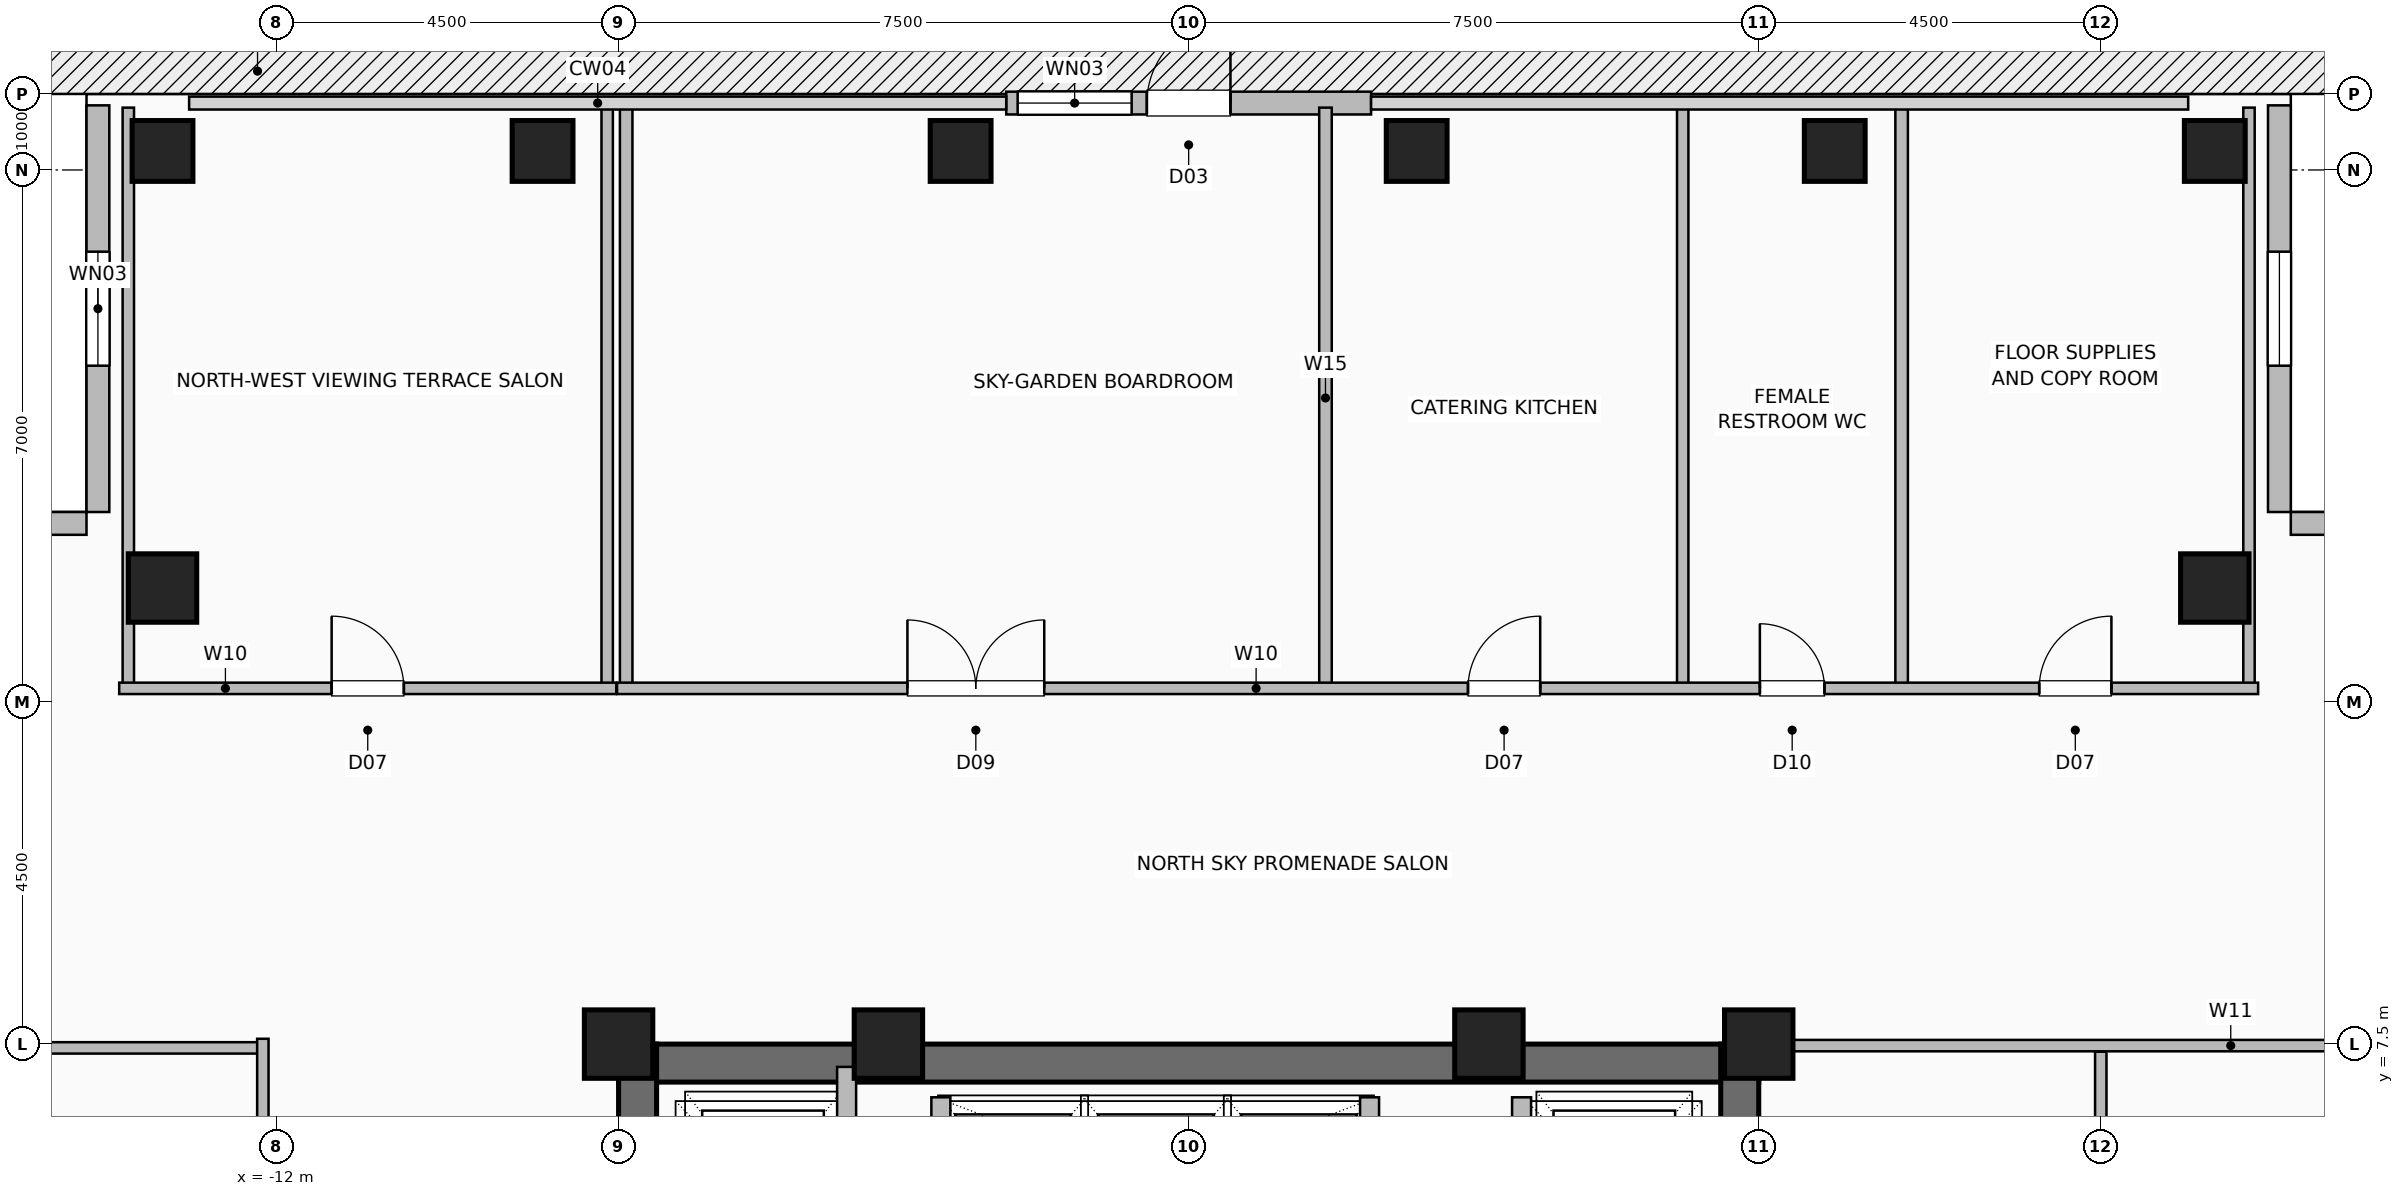
"""IFC4 building model, lengths in metres.
Left out: names, types, materials, properties, quantities, classifications, styles, units other than length and angle.
Written with IfcOpenShell. Run it as: python <this file> out.ifc"""

import sys

from ifc_helpers import new_model, si_unit, direction, frame, frame_2d, origin, origin_2d, place, context, subcontext, project, spatial, rectangle, hollow_rectangle, extrude, element, fill, save


model = new_model("IFC4")
c1 = context("Model", 3, precision=1e-05, world=origin(), true_north=direction((0.0, 1.0)))
c2 = subcontext(c1, "Body", "Model", "MODEL_VIEW")
j1 = project(units=[si_unit("LENGTHUNIT", "METRE"), si_unit("PLANEANGLEUNIT", "RADIAN")], contexts=[c1])
p1 = place(None, origin())
s1 = spatial("IfcSite", under=j1, at=p1, CompositionType="ELEMENT")
p2 = place(p1, origin())
s2 = spatial("IfcBuilding", under=s1, at=p2, CompositionType="ELEMENT")
p3 = place(p2, frame((0.0, 0.0, 166.2)))
s3 = spatial("IfcBuildingStorey", under=s2, at=p3, CompositionType="ELEMENT", Elevation=166.2)
for number, where, z_axis, x_axis in (
    (1, (7.5, 7.5, 0.0), (0.0, 0.0, 1.0), (1.0, 0.0, 0.0)),
    (2, (3.95, 7.5, 0.0), (0.0, 0.0, 1.0), (1.0, 0.0, 0.0)),
    (3, (-3.95, 7.5, 0.0), (0.0, 0.0, 1.0), (1.0, 0.0, 0.0)),
    (4, (-7.5, 7.5, 0.0), (0.0, 0.0, 1.0), (1.0, 0.0, 0.0)),
):
    element("IfcColumn", number, at=place(p3, frame(where, z_axis=z_axis, x_axis=x_axis)), inside=s3, PredefinedType="COLUMN", context=c2, shape_type="SweptSolid", body=[
        extrude(hollow_rectangle(XDim=0.9, YDim=0.9, WallThickness=0.045, at=origin_2d()), origin(), (0.0, 0.0, 1.0), 3.6),
    ])
for number, where, z_axis, x_axis in (
    (5, (-13.5, 19.25, -0.4), (0.0, 0.0, 1.0), (1.0, 0.0, 0.0)),
    (6, (-8.5, 19.25, -0.4), (0.0, 0.0, 1.0), (1.0, 0.0, 0.0)),
    (7, (-3.0, 19.25, -0.4), (0.0, 0.0, 1.0), (1.0, 0.0, 0.0)),
    (8, (3.0, 19.25, -0.4), (0.0, 0.0, 1.0), (1.0, 0.0, 0.0)),
    (9, (8.5, 19.25, -0.4), (0.0, 0.0, 1.0), (1.0, 0.0, 0.0)),
    (10, (13.5, 19.25, -0.4), (0.0, 0.0, 1.0), (1.0, 0.0, 0.0)),
):
    element("IfcColumn", number, at=place(p3, frame(where, z_axis=z_axis, x_axis=x_axis)), inside=s3, PredefinedType="COLUMN", context=c2, shape_type="SweptSolid", body=[
        extrude(hollow_rectangle(XDim=0.8, YDim=0.8, WallThickness=0.04, at=origin_2d()), origin(), (0.0, 0.0, 1.0), 4.0),
    ])
for number, where, z_axis, x_axis in (
    (11, (13.5, 13.5, -0.4), (0.0, 0.0, 1.0), (1.0, 0.0, 0.0)),
    (12, (-13.5, 13.5, -0.4), (0.0, 0.0, 1.0), (1.0, 0.0, 0.0)),
):
    element("IfcColumn", number, at=place(p3, frame(where, z_axis=z_axis, x_axis=x_axis)), inside=s3, PredefinedType="COLUMN", context=c2, shape_type="SweptSolid", body=[
        extrude(hollow_rectangle(XDim=0.9, YDim=0.9, WallThickness=0.045, at=origin_2d()), origin(), (0.0, 0.0, 1.0), 4.0),
    ])
p4 = place(p3, frame((-2.4, 19.88, 0.0), z_axis=(0.0, 0.0, 1.0), x_axis=(1.0, 0.0, 0.0)))
e13 = element("IfcWall", 13, at=p4, inside=s3, PredefinedType="SOLIDWALL", context=c2, shape_type="SweptSolid", body=[
    extrude(rectangle(XDim=4.8, YDim=0.3, at=frame_2d((2.4, 0.0))), origin(), (0.0, 0.0, 1.0), 3.36),
])
p5 = place(p4, frame((1.85, 0.0, 0.0)))
e14 = element("IfcOpeningElement", 14, at=p5, cuts=e13, PredefinedType="OPENING", context=c2, shape_type="SweptSolid", body=[
    extrude(rectangle(XDim=1.1, YDim=2.2, at=frame_2d((0.55, 1.1))), frame((0.0, 0.16, 0.0), z_axis=(0.0, -1.0, 0.0), x_axis=(1.0, 0.0, 0.0)), (0.0, 0.0, 1.0), 0.32),
])
p6 = place(p4, frame((0.15, 0.0, 0.85)))
e15 = element("IfcOpeningElement", 15, at=p6, cuts=e13, PredefinedType="OPENING", context=c2, shape_type="SweptSolid", body=[
    extrude(rectangle(XDim=1.5, YDim=1.8, at=frame_2d((0.75, 0.9))), frame((0.0, 0.16, 0.0), z_axis=(0.0, -1.0, 0.0), x_axis=(1.0, 0.0, 0.0)), (0.0, 0.0, 1.0), 0.32),
])
p7 = place(p3, frame((14.35, 19.85, 0.0), z_axis=(0.0, 0.0, 1.0), x_axis=(0.0, -1.0, 0.0)))
e16 = element("IfcWall", 16, at=p7, inside=s3, PredefinedType="SOLIDWALL", context=c2, shape_type="SweptSolid", body=[
    extrude(rectangle(XDim=5.35, YDim=0.3, at=frame_2d((2.675, 0.0))), origin(), (0.0, 0.0, 1.0), 3.36),
])
p8 = place(p7, frame((1.925, 0.0, 0.9)))
e17 = element("IfcOpeningElement", 17, at=p8, cuts=e16, PredefinedType="OPENING", context=c2, shape_type="SweptSolid", body=[
    extrude(rectangle(XDim=1.5, YDim=1.8, at=frame_2d((0.75, 0.9))), frame((0.0, 0.16, 0.0), z_axis=(0.0, -1.0, 0.0), x_axis=(1.0, 0.0, 0.0)), (0.0, 0.0, 1.0), 0.32),
])
p9 = place(p3, frame((19.85, 14.35, 0.0), z_axis=(0.0, 0.0, 1.0), x_axis=(-1.0, 0.0, 0.0)))
e18 = element("IfcWall", 18, at=p9, inside=s3, PredefinedType="SOLIDWALL", context=c2, shape_type="SweptSolid", body=[
    extrude(rectangle(XDim=5.35, YDim=0.3, at=frame_2d((2.675, 0.0))), origin(), (0.0, 0.0, 1.0), 3.36),
])
p10 = place(p3, frame((-14.35, 19.85, 0.0), z_axis=(0.0, 0.0, 1.0), x_axis=(0.0, -1.0, 0.0)))
e19 = element("IfcWall", 19, at=p10, inside=s3, PredefinedType="SOLIDWALL", context=c2, shape_type="SweptSolid", body=[
    extrude(rectangle(XDim=5.35, YDim=0.3, at=frame_2d((2.675, 0.0))), origin(), (0.0, 0.0, 1.0), 3.36),
])
p11 = place(p10, frame((1.925, 0.0, 0.9)))
e20 = element("IfcOpeningElement", 20, at=p11, cuts=e19, PredefinedType="OPENING", context=c2, shape_type="SweptSolid", body=[
    extrude(rectangle(XDim=1.5, YDim=1.8, at=frame_2d((0.75, 0.9))), frame((0.0, 0.16, 0.0), z_axis=(0.0, -1.0, 0.0), x_axis=(1.0, 0.0, 0.0)), (0.0, 0.0, 1.0), 0.32),
])
p12 = place(p3, frame((-19.85, 14.35, 0.0), z_axis=(0.0, 0.0, 1.0), x_axis=(1.0, 0.0, 0.0)))
e21 = element("IfcWall", 21, at=p12, inside=s3, PredefinedType="SOLIDWALL", context=c2, shape_type="SweptSolid", body=[
    extrude(rectangle(XDim=5.35, YDim=0.3, at=frame_2d((2.675, 0.0))), origin(), (0.0, 0.0, 1.0), 3.36),
])
p13 = place(p3, frame((-7.5, 7.25, 0.0), z_axis=(0.0, 0.0, 1.0), x_axis=(1.0, 0.0, 0.0)))
e22 = element("IfcWall", 22, at=p13, inside=s3, PredefinedType="SHEAR", context=c2, shape_type="SweptSolid", body=[
    extrude(rectangle(XDim=15.0, YDim=0.5, at=frame_2d((7.5, 0.0))), origin(), (0.0, 0.0, 1.0), 3.36),
])
p14 = place(p3, frame((-7.25, -7.5, 0.0), z_axis=(0.0, 0.0, 1.0), x_axis=(0.0, 1.0, 0.0)))
e23 = element("IfcWall", 23, at=p14, inside=s3, PredefinedType="SHEAR", context=c2, shape_type="SweptSolid", body=[
    extrude(rectangle(XDim=15.0, YDim=0.5, at=frame_2d((7.5, 0.0))), origin(), (0.0, 0.0, 1.0), 3.36),
])
p15 = place(p14, frame((9.5, 0.0, 0.0)))
e24 = element("IfcOpeningElement", 24, at=p15, cuts=e23, PredefinedType="OPENING", context=c2, shape_type="SweptSolid", body=[
    extrude(rectangle(XDim=1.0, YDim=2.08, at=frame_2d((0.5, 1.04))), frame((0.0, 0.26, 0.0), z_axis=(0.0, -1.0, 0.0), x_axis=(1.0, 0.0, 0.0)), (0.0, 0.0, 1.0), 0.52),
])
p16 = place(p3, frame((7.25, -7.5, 0.0), z_axis=(0.0, 0.0, 1.0), x_axis=(0.0, 1.0, 0.0)))
e25 = element("IfcWall", 25, at=p16, inside=s3, PredefinedType="SHEAR", context=c2, shape_type="SweptSolid", body=[
    extrude(rectangle(XDim=15.0, YDim=0.5, at=frame_2d((7.5, 0.0))), origin(), (0.0, 0.0, 1.0), 3.36),
])
for number, where, z_axis, x_axis in (
    (26, (-3.26, 4.58, 0.0), (0.0, 0.0, 1.0), (0.0, 1.0, 0.0)),
    (27, (2.38, 4.58, 0.0), (0.0, 0.0, 1.0), (0.0, 1.0, 0.0)),
):
    element("IfcWall", number, at=place(p3, frame(where, z_axis=z_axis, x_axis=x_axis)), inside=s3, PredefinedType="SHEAR", context=c2, shape_type="SweptSolid", body=[
        extrude(rectangle(XDim=2.22, YDim=0.25, at=frame_2d((1.11, 0.0))), origin(), (0.0, 0.0, 1.0), 3.36),
    ])
p17 = place(p3, frame((-4.5, 4.35, 0.0), z_axis=(0.0, 0.0, 1.0), x_axis=(0.0, 1.0, 0.0)))
e28 = element("IfcWall", 28, at=p17, inside=s3, PredefinedType="SHEAR", context=c2, shape_type="SweptSolid", body=[
    extrude(rectangle(XDim=2.85, YDim=0.25, at=frame_2d((1.425, 0.0))), origin(), (0.0, 0.0, 1.0), 3.36),
])
p18 = place(p3, frame((4.38, 4.3, 0.0), z_axis=(0.0, 0.0, 1.0), x_axis=(0.0, 1.0, 0.0)))
e29 = element("IfcWall", 29, at=p18, inside=s3, PredefinedType="SHEAR", context=c2, shape_type="SweptSolid", body=[
    extrude(rectangle(XDim=2.5, YDim=0.25, at=frame_2d((1.25, 0.0))), origin(), (0.0, 0.0, 1.0), 3.36),
])
p19 = place(p18, frame((0.8, 0.0, 0.0)))
e30 = element("IfcOpeningElement", 30, at=p19, cuts=e29, PredefinedType="OPENING", context=c2, shape_type="SweptSolid", body=[
    extrude(rectangle(XDim=1.2, YDim=2.2, at=frame_2d((0.6, 1.1))), frame((0.0, 0.135, 0.0), z_axis=(0.0, -1.0, 0.0), x_axis=(1.0, 0.0, 0.0)), (0.0, 0.0, 1.0), 0.27),
])
p20 = place(p3, frame((-19.82, 7.45, 0.0), z_axis=(0.0, 0.0, 1.0), x_axis=(1.0, 0.0, 0.0)))
e31 = element("IfcWall", 31, at=p20, inside=s3, PredefinedType="PARTITIONING", context=c2, shape_type="SweptSolid", body=[
    extrude(rectangle(XDim=7.64, YDim=0.15, at=frame_2d((3.82, 0.0))), origin(), (0.0, 0.0, 1.0), 3.36),
])
p21 = place(p3, frame((-12.18, -7.57, 0.0), z_axis=(0.0, 0.0, 1.0), x_axis=(0.0, 1.0, 0.0)))
e32 = element("IfcWall", 32, at=p21, inside=s3, PredefinedType="PARTITIONING", context=c2, shape_type="SweptSolid", body=[
    extrude(rectangle(XDim=15.14, YDim=0.15, at=frame_2d((7.57, 0.0))), origin(), (0.0, 0.0, 1.0), 3.36),
])
p22 = place(p21, frame((5.045, 0.0, 0.0)))
e33 = element("IfcOpeningElement", 33, at=p22, cuts=e32, PredefinedType="OPENING", context=c2, shape_type="SweptSolid", body=[
    extrude(rectangle(XDim=1.8, YDim=2.08, at=frame_2d((0.9, 1.04))), frame((0.0, 0.085, 0.0), z_axis=(0.0, -1.0, 0.0), x_axis=(1.0, 0.0, 0.0)), (0.0, 0.0, 1.0), 0.17),
])
p23 = place(p21, frame((12.97, 0.0, 0.0)))
e34 = element("IfcOpeningElement", 34, at=p23, cuts=e32, PredefinedType="OPENING", context=c2, shape_type="SweptSolid", body=[
    extrude(rectangle(XDim=0.85, YDim=2.05, at=frame_2d((0.425, 1.025))), frame((0.0, 0.085, 0.0), z_axis=(0.0, -1.0, 0.0), x_axis=(1.0, 0.0, 0.0)), (0.0, 0.0, 1.0), 0.17),
])
for number, where, z_axis, x_axis in (
    (35, (-13.95, 12.18, 0.0), (0.0, 0.0, 1.0), (0.0, 1.0, 0.0)),
    (36, (-7.65, 12.18, 0.0), (0.0, 0.0, 1.0), (0.0, 1.0, 0.0)),
):
    element("IfcWall", number, at=place(p3, frame(where, z_axis=z_axis, x_axis=x_axis)), inside=s3, PredefinedType="PARTITIONING", context=c2, shape_type="SweptSolid", body=[
        extrude(rectangle(XDim=7.64, YDim=0.15, at=frame_2d((3.82, 0.0))), origin(), (0.0, 0.0, 1.0), 3.36),
    ])
p24 = place(p3, frame((-14.07, 12.18, 0.0), z_axis=(0.0, 0.0, 1.0), x_axis=(1.0, 0.0, 0.0)))
e37 = element("IfcWall", 37, at=p24, inside=s3, PredefinedType="PARTITIONING", context=c2, shape_type="SweptSolid", body=[
    extrude(rectangle(XDim=6.54, YDim=0.15, at=frame_2d((3.27, 0.0))), origin(), (0.0, 0.0, 1.0), 3.36),
])
p25 = place(p24, frame((2.795, 0.0, 0.0)))
e38 = element("IfcOpeningElement", 38, at=p25, cuts=e37, PredefinedType="OPENING", context=c2, shape_type="SweptSolid", body=[
    extrude(rectangle(XDim=0.95, YDim=2.06, at=frame_2d((0.475, 1.03))), frame((0.0, 0.085, 0.0), z_axis=(0.0, -1.0, 0.0), x_axis=(1.0, 0.0, 0.0)), (0.0, 0.0, 1.0), 0.17),
])
for number, where, z_axis, x_axis in (
    (39, (9.38, 12.18, 0.0), (0.0, 0.0, 1.0), (0.0, 1.0, 0.0)),
    (40, (-7.4, 12.18, 0.0), (0.0, 0.0, 1.0), (0.0, 1.0, 0.0)),
    (41, (1.8, 12.18, 0.0), (0.0, 0.0, 1.0), (0.0, 1.0, 0.0)),
):
    element("IfcWall", number, at=place(p3, frame(where, z_axis=z_axis, x_axis=x_axis)), inside=s3, PredefinedType="PLUMBINGWALL", context=c2, shape_type="SweptSolid", body=[
        extrude(rectangle(XDim=7.64, YDim=0.165, at=frame_2d((3.82, 0.0))), origin(), (0.0, 0.0, 1.0), 3.36),
    ])
for number, where, z_axis, x_axis in (
    (42, (6.5, 12.18, 0.0), (0.0, 0.0, 1.0), (0.0, 1.0, 0.0)),
    (43, (13.95, 12.18, 0.0), (0.0, 0.0, 1.0), (0.0, 1.0, 0.0)),
):
    element("IfcWall", number, at=place(p3, frame(where, z_axis=z_axis, x_axis=x_axis)), inside=s3, PredefinedType="PARTITIONING", context=c2, shape_type="SweptSolid", body=[
        extrude(rectangle(XDim=7.64, YDim=0.15, at=frame_2d((3.82, 0.0))), origin(), (0.0, 0.0, 1.0), 3.36),
    ])
p26 = place(p3, frame((-7.52, 12.18, 0.0), z_axis=(0.0, 0.0, 1.0), x_axis=(1.0, 0.0, 0.0)))
e44 = element("IfcWall", 44, at=p26, inside=s3, PredefinedType="PARTITIONING", context=c2, shape_type="SweptSolid", body=[
    extrude(rectangle(XDim=21.59, YDim=0.15, at=frame_2d((10.795, 0.0))), origin(), (0.0, 0.0, 1.0), 3.36),
])
p27 = place(p26, frame((3.82, 0.0, 0.0)))
e45 = element("IfcOpeningElement", 45, at=p27, cuts=e44, PredefinedType="OPENING", context=c2, shape_type="SweptSolid", body=[
    extrude(rectangle(XDim=1.8, YDim=2.08, at=frame_2d((0.9, 1.04))), frame((0.0, 0.085, 0.0), z_axis=(0.0, -1.0, 0.0), x_axis=(1.0, 0.0, 0.0)), (0.0, 0.0, 1.0), 0.17),
])
p28 = place(p26, frame((11.195, 0.0, 0.0)))
e46 = element("IfcOpeningElement", 46, at=p28, cuts=e44, PredefinedType="OPENING", context=c2, shape_type="SweptSolid", body=[
    extrude(rectangle(XDim=0.95, YDim=2.06, at=frame_2d((0.475, 1.03))), frame((0.0, 0.085, 0.0), z_axis=(0.0, -1.0, 0.0), x_axis=(1.0, 0.0, 0.0)), (0.0, 0.0, 1.0), 0.17),
])
p29 = place(p26, frame((15.035, 0.0, 0.0)))
e47 = element("IfcOpeningElement", 47, at=p29, cuts=e44, PredefinedType="OPENING", context=c2, shape_type="SweptSolid", body=[
    extrude(rectangle(XDim=0.85, YDim=2.05, at=frame_2d((0.425, 1.025))), frame((0.0, 0.085, 0.0), z_axis=(0.0, -1.0, 0.0), x_axis=(1.0, 0.0, 0.0)), (0.0, 0.0, 1.0), 0.17),
])
p30 = place(p26, frame((18.71, 0.0, 0.0)))
e48 = element("IfcOpeningElement", 48, at=p30, cuts=e44, PredefinedType="OPENING", context=c2, shape_type="SweptSolid", body=[
    extrude(rectangle(XDim=0.95, YDim=2.06, at=frame_2d((0.475, 1.03))), frame((0.0, 0.085, 0.0), z_axis=(0.0, -1.0, 0.0), x_axis=(1.0, 0.0, 0.0)), (0.0, 0.0, 1.0), 0.17),
])
p31 = place(p3, frame((12.0, -7.48, 0.0), z_axis=(0.0, 0.0, 1.0), x_axis=(0.0, 1.0, 0.0)))
e49 = element("IfcWall", 49, at=p31, inside=s3, PredefinedType="PARTITIONING", context=c2, shape_type="SweptSolid", body=[
    extrude(rectangle(XDim=14.88, YDim=0.15, at=frame_2d((7.44, 0.0))), origin(), (0.0, 0.0, 1.0), 3.36),
])
p32 = place(p3, frame((7.6, 7.48, 0.0), z_axis=(0.0, 0.0, 1.0), x_axis=(1.0, 0.0, 0.0)))
e50 = element("IfcWall", 50, at=p32, inside=s3, PredefinedType="PARTITIONING", context=c2, shape_type="SweptSolid", body=[
    extrude(rectangle(XDim=12.22, YDim=0.15, at=frame_2d((6.11, 0.0))), origin(), (0.0, 0.0, 1.0), 3.36),
])
p33 = place(p5, origin())
e51 = element("IfcDoor", 51, at=p33, inside=s3, OperationType="SINGLE_SWING_RIGHT", PredefinedType="DOOR", context=c2, shape_type="SweptSolid", body=[
    extrude(rectangle(XDim=1.1, YDim=2.2, at=frame_2d((0.55, 1.1))), frame((0.0, 0.025, 0.0), z_axis=(0.0, -1.0, 0.0), x_axis=(1.0, 0.0, 0.0)), (0.0, 0.0, 1.0), 0.05),
])
fill(e14, e51)
p34 = place(p6, origin())
e52 = element("IfcWindow", 52, at=p34, inside=s3, PartitioningType="SINGLE_PANEL", PredefinedType="WINDOW", context=c2, shape_type="SweptSolid", body=[
    extrude(rectangle(XDim=1.5, YDim=1.8, at=frame_2d((0.75, 0.9))), frame((0.0, 0.03, 0.0), z_axis=(0.0, -1.0, 0.0), x_axis=(1.0, 0.0, 0.0)), (0.0, 0.0, 1.0), 0.06),
])
fill(e15, e52)
p35 = place(p8, origin())
e53 = element("IfcWindow", 53, at=p35, inside=s3, PartitioningType="SINGLE_PANEL", PredefinedType="WINDOW", context=c2, shape_type="SweptSolid", body=[
    extrude(rectangle(XDim=1.5, YDim=1.8, at=frame_2d((0.75, 0.9))), frame((0.0, 0.03, 0.0), z_axis=(0.0, -1.0, 0.0), x_axis=(1.0, 0.0, 0.0)), (0.0, 0.0, 1.0), 0.06),
])
fill(e17, e53)
p36 = place(p11, origin())
e54 = element("IfcWindow", 54, at=p36, inside=s3, PartitioningType="SINGLE_PANEL", PredefinedType="WINDOW", context=c2, shape_type="SweptSolid", body=[
    extrude(rectangle(XDim=1.5, YDim=1.8, at=frame_2d((0.75, 0.9))), frame((0.0, 0.03, 0.0), z_axis=(0.0, -1.0, 0.0), x_axis=(1.0, 0.0, 0.0)), (0.0, 0.0, 1.0), 0.06),
])
fill(e20, e54)
p37 = place(p25, origin())
e55 = element("IfcDoor", 55, at=p37, inside=s3, OperationType="SINGLE_SWING_LEFT", PredefinedType="DOOR", context=c2, shape_type="SweptSolid", body=[
    extrude(rectangle(XDim=0.95, YDim=2.06, at=frame_2d((0.475, 1.03))), frame((0.0, 0.025, 0.0), z_axis=(0.0, -1.0, 0.0), x_axis=(1.0, 0.0, 0.0)), (0.0, 0.0, 1.0), 0.05),
])
fill(e38, e55)
p38 = place(p27, origin())
e56 = element("IfcDoor", 56, at=p38, inside=s3, OperationType="DOUBLE_DOOR_SINGLE_SWING", PredefinedType="DOOR", context=c2, shape_type="SweptSolid", body=[
    extrude(rectangle(XDim=1.8, YDim=2.08, at=frame_2d((0.9, 1.04))), frame((0.0, 0.025, 0.0), z_axis=(0.0, -1.0, 0.0), x_axis=(1.0, 0.0, 0.0)), (0.0, 0.0, 1.0), 0.05),
])
fill(e45, e56)
p39 = place(p28, origin())
e57 = element("IfcDoor", 57, at=p39, inside=s3, OperationType="SINGLE_SWING_RIGHT", PredefinedType="DOOR", context=c2, shape_type="SweptSolid", body=[
    extrude(rectangle(XDim=0.95, YDim=2.06, at=frame_2d((0.475, 1.03))), frame((0.0, 0.025, 0.0), z_axis=(0.0, -1.0, 0.0), x_axis=(1.0, 0.0, 0.0)), (0.0, 0.0, 1.0), 0.05),
])
fill(e46, e57)
p40 = place(p29, origin())
e58 = element("IfcDoor", 58, at=p40, inside=s3, OperationType="SINGLE_SWING_LEFT", PredefinedType="DOOR", context=c2, shape_type="SweptSolid", body=[
    extrude(rectangle(XDim=0.85, YDim=2.05, at=frame_2d((0.425, 1.025))), frame((0.0, 0.025, 0.0), z_axis=(0.0, -1.0, 0.0), x_axis=(1.0, 0.0, 0.0)), (0.0, 0.0, 1.0), 0.05),
])
fill(e47, e58)
p41 = place(p30, origin())
e59 = element("IfcDoor", 59, at=p41, inside=s3, OperationType="SINGLE_SWING_RIGHT", PredefinedType="DOOR", context=c2, shape_type="SweptSolid", body=[
    extrude(rectangle(XDim=0.95, YDim=2.06, at=frame_2d((0.475, 1.03))), frame((0.0, 0.025, 0.0), z_axis=(0.0, -1.0, 0.0), x_axis=(1.0, 0.0, 0.0)), (0.0, 0.0, 1.0), 0.05),
])
fill(e48, e59)
save(model, sys.argv[1])
